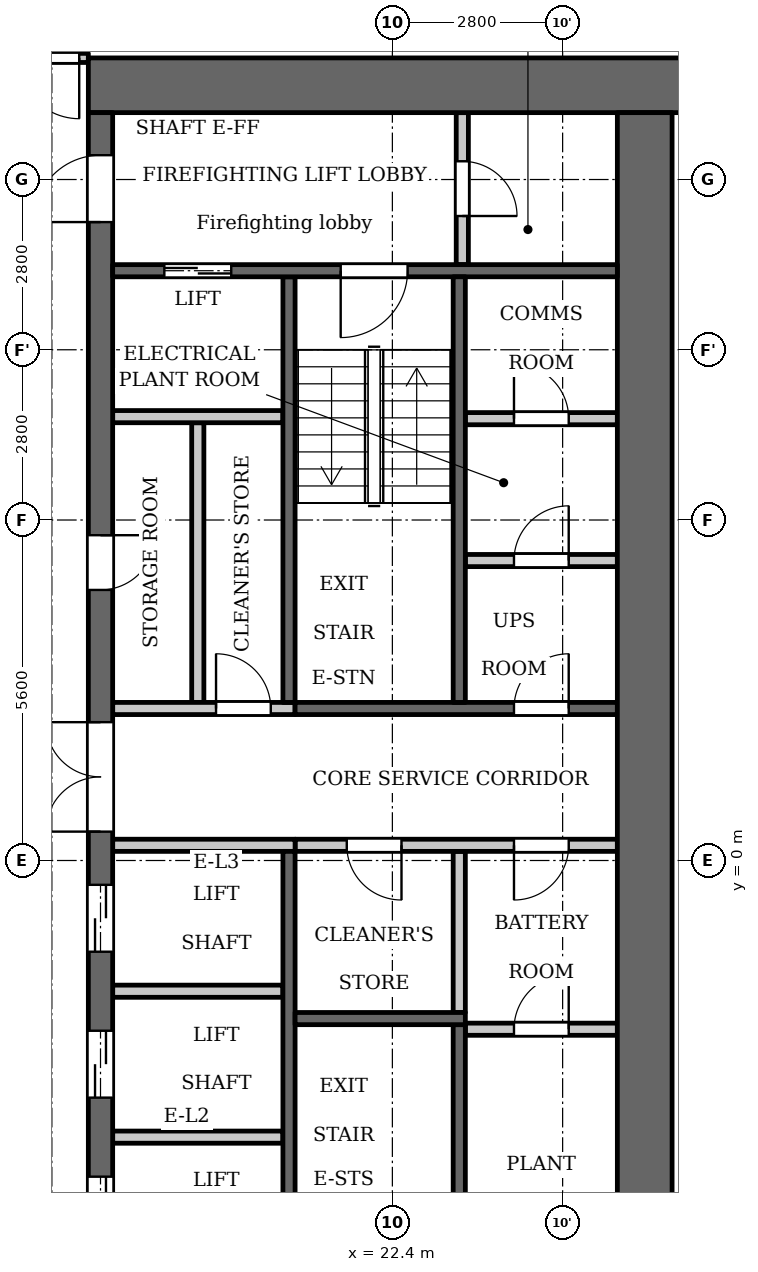
"""IFC4 building model, lengths in metres.
Left out: names, types, materials, properties, quantities, classifications, styles, units other than length and angle.
Written with IfcOpenShell. Run it as: python <this file> out.ifc"""

import sys

from ifc_helpers import new_model, si_unit, direction, frame, frame_2d, origin, place, context, subcontext, project, spatial, rectangle, extrude, element, fill, save


model = new_model("IFC4")
c1 = context("Model", 3, precision=1e-05, world=origin(), true_north=direction((0.0, 1.0)))
c2 = subcontext(c1, "Body", "Model", "MODEL_VIEW")
j1 = project(units=[si_unit("LENGTHUNIT", "METRE"), si_unit("PLANEANGLEUNIT", "RADIAN")], contexts=[c1])
p1 = place(None, origin())
s1 = spatial("IfcSite", under=j1, at=p1, CompositionType="ELEMENT")
p2 = place(p1, origin())
s2 = spatial("IfcBuilding", under=s1, at=p2, CompositionType="ELEMENT")
p3 = place(p2, frame((0.0, 0.0, 83.3)))
s3 = spatial("IfcBuildingStorey", under=s2, at=p3, CompositionType="ELEMENT", Elevation=83.3)
p4 = place(p3, frame((23.5, -2.5, 0.0), z_axis=(0.0, 0.0, 1.0), x_axis=(0.0, 1.0, 0.0)))
e1 = element("IfcWall", 1, at=p4, inside=s3, PredefinedType="PARTITIONING", context=c2, shape_type="SweptSolid", body=[
    extrude(rectangle(XDim=2.65, YDim=0.2, at=frame_2d((1.325, 0.0))), origin(), (0.0, 0.0, 1.0), 3.2),
])
p5 = place(p3, frame((20.7, 2.6, 0.0), z_axis=(0.0, 0.0, 1.0), x_axis=(0.0, 1.0, 0.0)))
e2 = element("IfcWall", 2, at=p5, inside=s3, PredefinedType="SHEAR", context=c2, shape_type="SweptSolid", body=[
    extrude(rectangle(XDim=7.0, YDim=0.2, at=frame_2d((3.5, 0.0))), origin(), (0.0, 0.0, 1.0), 3.2),
])
p6 = place(p3, frame((20.7, -9.6, 0.0), z_axis=(0.0, 0.0, 1.0), x_axis=(0.0, 1.0, 0.0)))
e3 = element("IfcWall", 3, at=p6, inside=s3, PredefinedType="SHEAR", context=c2, shape_type="SweptSolid", body=[
    extrude(rectangle(XDim=9.75, YDim=0.2, at=frame_2d((4.875, 0.0))), origin(), (0.0, 0.0, 1.0), 3.2),
])
p7 = place(p3, frame((20.8, 2.5, 0.0), z_axis=(0.0, 0.0, 1.0), x_axis=(1.0, 0.0, 0.0)))
e4 = element("IfcWall", 4, at=p7, inside=s3, PredefinedType="SHEAR", context=c2, shape_type="SweptSolid", body=[
    extrude(rectangle(XDim=5.3, YDim=0.2, at=frame_2d((2.65, 0.0))), origin(), (0.0, 0.0, 1.0), 3.2),
])
p8 = place(p7, frame((3.6, 0.0, 0.0)))
e5 = element("IfcOpeningElement", 5, at=p8, cuts=e4, PredefinedType="OPENING", context=c2, shape_type="SweptSolid", body=[
    extrude(rectangle(XDim=0.9, YDim=2.1, at=frame_2d((0.45, 1.05))), frame((0.0, 0.11, 0.0), z_axis=(0.0, -1.0, 0.0), x_axis=(1.0, 0.0, 0.0)), (0.0, 0.0, 1.0), 0.22),
])
p9 = place(p3, frame((20.8, 0.25, 0.0), z_axis=(0.0, 0.0, 1.0), x_axis=(1.0, 0.0, 0.0)))
e6 = element("IfcWall", 6, at=p9, inside=s3, PredefinedType="PARTITIONING", context=c2, shape_type="SweptSolid", body=[
    extrude(rectangle(XDim=5.3, YDim=0.2, at=frame_2d((2.65, 0.0))), origin(), (0.0, 0.0, 1.0), 3.2),
])
p10 = place(p9, frame((0.85, 0.0, 0.0)))
e7 = element("IfcOpeningElement", 7, at=p10, cuts=e6, PredefinedType="OPENING", context=c2, shape_type="SweptSolid", body=[
    extrude(rectangle(XDim=0.9, YDim=2.1, at=frame_2d((0.45, 1.05))), frame((0.0, 0.11, 0.0), z_axis=(0.0, -1.0, 0.0), x_axis=(1.0, 0.0, 0.0)), (0.0, 0.0, 1.0), 0.22),
])
p11 = place(p9, frame((3.6, 0.0, 0.0)))
e8 = element("IfcOpeningElement", 8, at=p11, cuts=e6, PredefinedType="OPENING", context=c2, shape_type="SweptSolid", body=[
    extrude(rectangle(XDim=0.9, YDim=2.1, at=frame_2d((0.45, 1.05))), frame((0.0, 0.11, 0.0), z_axis=(0.0, -1.0, 0.0), x_axis=(1.0, 0.0, 0.0)), (0.0, 0.0, 1.0), 0.22),
])
p12 = place(p3, frame((17.4, 12.75, 0.0), z_axis=(0.0, 0.0, 1.0), x_axis=(1.0, 0.0, 0.0)))
e9 = element("IfcWall", 9, at=p12, inside=s3, PredefinedType="SHEAR", context=c2, shape_type="SweptSolid", body=[
    extrude(rectangle(XDim=10.4, YDim=0.9, at=frame_2d((5.2, 0.0))), origin(), (0.0, 0.0, 1.0), 3.2),
])
p13 = place(p3, frame((19.2, 2.6, 0.0), z_axis=(0.0, 0.0, 1.0), x_axis=(0.0, 1.0, 0.0)))
e10 = element("IfcWall", 10, at=p13, inside=s3, PredefinedType="PARTITIONING", context=c2, shape_type="SweptSolid", body=[
    extrude(rectangle(XDim=4.6, YDim=0.2, at=frame_2d((2.3, 0.0))), origin(), (0.0, 0.0, 1.0), 3.2),
])
p14 = place(p3, frame((17.6, -12.3, 0.0), z_axis=(0.0, 0.0, 1.0), x_axis=(0.0, 1.0, 0.0)))
e11 = element("IfcWall", 11, at=p14, inside=s3, PredefinedType="SHEAR", context=c2, shape_type="SweptSolid", body=[
    extrude(rectangle(XDim=24.6, YDim=0.4, at=frame_2d((12.3, 0.0))), origin(), (0.0, 0.0, 1.0), 3.2),
])
p15 = place(p14, frame((6.0, 0.0, 0.0)))
e12 = element("IfcOpeningElement", 12, at=p15, cuts=e11, PredefinedType="OPENING", context=c2, shape_type="SweptSolid", body=[
    extrude(rectangle(XDim=1.1, YDim=2.1, at=frame_2d((0.55, 1.05))), frame((0.0, 0.21, 0.0), z_axis=(0.0, -1.0, 0.0), x_axis=(1.0, 0.0, 0.0)), (0.0, 0.0, 1.0), 0.42),
])
p16 = place(p14, frame((8.4, 0.0, 0.0)))
e13 = element("IfcOpeningElement", 13, at=p16, cuts=e11, PredefinedType="OPENING", context=c2, shape_type="SweptSolid", body=[
    extrude(rectangle(XDim=1.1, YDim=2.1, at=frame_2d((0.55, 1.05))), frame((0.0, 0.21, 0.0), z_axis=(0.0, -1.0, 0.0), x_axis=(1.0, 0.0, 0.0)), (0.0, 0.0, 1.0), 0.42),
])
p17 = place(p14, frame((10.8, 0.0, 0.0)))
e14 = element("IfcOpeningElement", 14, at=p17, cuts=e11, PredefinedType="OPENING", context=c2, shape_type="SweptSolid", body=[
    extrude(rectangle(XDim=1.1, YDim=2.1, at=frame_2d((0.55, 1.05))), frame((0.0, 0.21, 0.0), z_axis=(0.0, -1.0, 0.0), x_axis=(1.0, 0.0, 0.0)), (0.0, 0.0, 1.0), 0.42),
])
p18 = place(p14, frame((16.75, 0.0, 0.0)))
e15 = element("IfcOpeningElement", 15, at=p18, cuts=e11, PredefinedType="OPENING", context=c2, shape_type="SweptSolid", body=[
    extrude(rectangle(XDim=0.9, YDim=2.1, at=frame_2d((0.45, 1.05))), frame((0.0, 0.21, 0.0), z_axis=(0.0, -1.0, 0.0), x_axis=(1.0, 0.0, 0.0)), (0.0, 0.0, 1.0), 0.42),
])
p19 = place(p14, frame((22.8, 0.0, 0.0)))
e16 = element("IfcOpeningElement", 16, at=p19, cuts=e11, PredefinedType="OPENING", context=c2, shape_type="SweptSolid", body=[
    extrude(rectangle(XDim=1.1, YDim=2.1, at=frame_2d((0.55, 1.05))), frame((0.0, 0.21, 0.0), z_axis=(0.0, -1.0, 0.0), x_axis=(1.0, 0.0, 0.0)), (0.0, 0.0, 1.0), 0.42),
])
p20 = place(p14, frame((0.7, 0.0, 0.0)))
e17 = element("IfcOpeningElement", 17, at=p20, cuts=e11, PredefinedType="OPENING", context=c2, shape_type="SweptSolid", body=[
    extrude(rectangle(XDim=1.1, YDim=2.1, at=frame_2d((0.55, 1.05))), frame((0.0, 0.21, 0.0), z_axis=(0.0, -1.0, 0.0), x_axis=(1.0, 0.0, 0.0)), (0.0, 0.0, 1.0), 0.42),
])
p21 = place(p14, frame((12.775, 0.0, 0.0)))
e18 = element("IfcOpeningElement", 18, at=p21, cuts=e11, PredefinedType="OPENING", context=c2, shape_type="SweptSolid", body=[
    extrude(rectangle(XDim=1.8, YDim=2.1, at=frame_2d((0.9, 1.05))), frame((0.0, 0.21, 0.0), z_axis=(0.0, -1.0, 0.0), x_axis=(1.0, 0.0, 0.0)), (0.0, 0.0, 1.0), 0.42),
])
p22 = place(p3, frame((26.55, -12.3, 0.0), z_axis=(0.0, 0.0, 1.0), x_axis=(0.0, 1.0, 0.0)))
e19 = element("IfcWall", 19, at=p22, inside=s3, PredefinedType="SHEAR", context=c2, shape_type="SweptSolid", body=[
    extrude(rectangle(XDim=24.6, YDim=0.9, at=frame_2d((12.3, 0.0))), origin(), (0.0, 0.0, 1.0), 3.2),
])
p23 = place(p3, frame((23.55, 9.8, 0.0), z_axis=(0.0, 0.0, 1.0), x_axis=(0.0, 1.0, 0.0)))
e20 = element("IfcWall", 20, at=p23, inside=s3, PredefinedType="PARTITIONING", context=c2, shape_type="SweptSolid", body=[
    extrude(rectangle(XDim=2.5, YDim=0.2, at=frame_2d((1.25, 0.0))), origin(), (0.0, 0.0, 1.0), 3.2),
])
p24 = place(p23, frame((0.8, 0.0, 0.0)))
e21 = element("IfcOpeningElement", 21, at=p24, cuts=e20, PredefinedType="OPENING", context=c2, shape_type="SweptSolid", body=[
    extrude(rectangle(XDim=0.9, YDim=2.1, at=frame_2d((0.45, 1.05))), frame((0.0, 0.11, 0.0), z_axis=(0.0, -1.0, 0.0), x_axis=(1.0, 0.0, 0.0)), (0.0, 0.0, 1.0), 0.22),
])
p25 = place(p3, frame((23.6, -2.775, 0.0), z_axis=(0.0, 0.0, 1.0), x_axis=(1.0, 0.0, 0.0)))
e22 = element("IfcWall", 22, at=p25, inside=s3, PredefinedType="PARTITIONING", context=c2, shape_type="SweptSolid", body=[
    extrude(rectangle(XDim=2.5, YDim=0.2, at=frame_2d((1.25, 0.0))), origin(), (0.0, 0.0, 1.0), 3.2),
])
p26 = place(p25, frame((0.8, 0.0, 0.0)))
e23 = element("IfcOpeningElement", 23, at=p26, cuts=e22, PredefinedType="OPENING", context=c2, shape_type="SweptSolid", body=[
    extrude(rectangle(XDim=0.9, YDim=2.1, at=frame_2d((0.45, 1.05))), frame((0.0, 0.11, 0.0), z_axis=(0.0, -1.0, 0.0), x_axis=(1.0, 0.0, 0.0)), (0.0, 0.0, 1.0), 0.22),
])
p27 = place(p3, frame((23.6, 4.933, 0.0), z_axis=(0.0, 0.0, 1.0), x_axis=(1.0, 0.0, 0.0)))
e24 = element("IfcWall", 24, at=p27, inside=s3, PredefinedType="PARTITIONING", context=c2, shape_type="SweptSolid", body=[
    extrude(rectangle(XDim=2.5, YDim=0.2, at=frame_2d((1.25, 0.0))), origin(), (0.0, 0.0, 1.0), 3.2),
])
p28 = place(p27, frame((0.8, 0.0, 0.0)))
e25 = element("IfcOpeningElement", 25, at=p28, cuts=e24, PredefinedType="OPENING", context=c2, shape_type="SweptSolid", body=[
    extrude(rectangle(XDim=0.9, YDim=2.1, at=frame_2d((0.45, 1.05))), frame((0.0, 0.11, 0.0), z_axis=(0.0, -1.0, 0.0), x_axis=(1.0, 0.0, 0.0)), (0.0, 0.0, 1.0), 0.22),
])
p29 = place(p3, frame((23.6, 7.267, 0.0), z_axis=(0.0, 0.0, 1.0), x_axis=(1.0, 0.0, 0.0)))
e26 = element("IfcWall", 26, at=p29, inside=s3, PredefinedType="PARTITIONING", context=c2, shape_type="SweptSolid", body=[
    extrude(rectangle(XDim=2.5, YDim=0.2, at=frame_2d((1.25, 0.0))), origin(), (0.0, 0.0, 1.0), 3.2),
])
p30 = place(p29, frame((0.8, 0.0, 0.0)))
e27 = element("IfcOpeningElement", 27, at=p30, cuts=e26, PredefinedType="OPENING", context=c2, shape_type="SweptSolid", body=[
    extrude(rectangle(XDim=0.9, YDim=2.1, at=frame_2d((0.45, 1.05))), frame((0.0, 0.11, 0.0), z_axis=(0.0, -1.0, 0.0), x_axis=(1.0, 0.0, 0.0)), (0.0, 0.0, 1.0), 0.22),
])
for number, where, z_axis, x_axis in (
    (28, (17.8, -4.55, 0.0), (0.0, 0.0, 1.0), (1.0, 0.0, 0.0)),
    (29, (17.8, -2.15, 0.0), (0.0, 0.0, 1.0), (1.0, 0.0, 0.0)),
):
    element("IfcWall", number, at=place(p3, frame(where, z_axis=z_axis, x_axis=x_axis)), inside=s3, PredefinedType="PARTITIONING", context=c2, shape_type="SweptSolid", body=[
        extrude(rectangle(XDim=2.8, YDim=0.2, at=frame_2d((1.4, 0.0))), origin(), (0.0, 0.0, 1.0), 3.2),
    ])
p31 = place(p3, frame((17.8, 0.25, 0.0), z_axis=(0.0, 0.0, 1.0), x_axis=(1.0, 0.0, 0.0)))
e30 = element("IfcWall", 30, at=p31, inside=s3, PredefinedType="PARTITIONING", context=c2, shape_type="SweptSolid", body=[
    extrude(rectangle(XDim=3.0, YDim=0.2, at=frame_2d((1.5, 0.0))), origin(), (0.0, 0.0, 1.0), 3.2),
])
p32 = place(p3, frame((17.8, 2.5, 0.0), z_axis=(0.0, 0.0, 1.0), x_axis=(1.0, 0.0, 0.0)))
e31 = element("IfcWall", 31, at=p32, inside=s3, PredefinedType="PARTITIONING", context=c2, shape_type="SweptSolid", body=[
    extrude(rectangle(XDim=3.0, YDim=0.2, at=frame_2d((1.5, 0.0))), origin(), (0.0, 0.0, 1.0), 3.2),
])
p33 = place(p32, frame((1.7, 0.0, 0.0)))
e32 = element("IfcOpeningElement", 32, at=p33, cuts=e31, PredefinedType="OPENING", context=c2, shape_type="SweptSolid", body=[
    extrude(rectangle(XDim=0.9, YDim=2.1, at=frame_2d((0.45, 1.05))), frame((0.0, 0.11, 0.0), z_axis=(0.0, -1.0, 0.0), x_axis=(1.0, 0.0, 0.0)), (0.0, 0.0, 1.0), 0.22),
])
p34 = place(p3, frame((17.8, 7.3, 0.0), z_axis=(0.0, 0.0, 1.0), x_axis=(1.0, 0.0, 0.0)))
e33 = element("IfcWall", 33, at=p34, inside=s3, PredefinedType="PARTITIONING", context=c2, shape_type="SweptSolid", body=[
    extrude(rectangle(XDim=2.8, YDim=0.2, at=frame_2d((1.4, 0.0))), origin(), (0.0, 0.0, 1.0), 3.2),
])
p35 = place(p3, frame((17.8, 9.7, 0.0), z_axis=(0.0, 0.0, 1.0), x_axis=(1.0, 0.0, 0.0)))
e34 = element("IfcWall", 34, at=p35, inside=s3, PredefinedType="SHEAR", context=c2, shape_type="SweptSolid", body=[
    extrude(rectangle(XDim=8.3, YDim=0.2, at=frame_2d((4.15, 0.0))), origin(), (0.0, 0.0, 1.0), 3.2),
])
p36 = place(p35, frame((0.85, 0.0, 0.0)))
e35 = element("IfcOpeningElement", 35, at=p36, cuts=e34, PredefinedType="OPENING", context=c2, shape_type="SweptSolid", body=[
    extrude(rectangle(XDim=1.1, YDim=2.1, at=frame_2d((0.55, 1.05))), frame((0.0, 0.11, 0.0), z_axis=(0.0, -1.0, 0.0), x_axis=(1.0, 0.0, 0.0)), (0.0, 0.0, 1.0), 0.22),
])
p37 = place(p35, frame((3.75, 0.0, 0.0)))
e36 = element("IfcOpeningElement", 36, at=p37, cuts=e34, PredefinedType="OPENING", context=c2, shape_type="SweptSolid", body=[
    extrude(rectangle(XDim=1.1, YDim=2.1, at=frame_2d((0.55, 1.05))), frame((0.0, 0.11, 0.0), z_axis=(0.0, -1.0, 0.0), x_axis=(1.0, 0.0, 0.0)), (0.0, 0.0, 1.0), 0.22),
])
p38 = place(p3, frame((23.5, 2.6, 0.0), z_axis=(0.0, 0.0, 1.0), x_axis=(0.0, 1.0, 0.0)))
e37 = element("IfcWall", 37, at=p38, inside=s3, PredefinedType="SHEAR", context=c2, shape_type="SweptSolid", body=[
    extrude(rectangle(XDim=7.0, YDim=0.2, at=frame_2d((3.5, 0.0))), origin(), (0.0, 0.0, 1.0), 3.2),
])
p39 = place(p3, frame((23.5, -9.6, 0.0), z_axis=(0.0, 0.0, 1.0), x_axis=(0.0, 1.0, 0.0)))
e38 = element("IfcWall", 38, at=p39, inside=s3, PredefinedType="SHEAR", context=c2, shape_type="SweptSolid", body=[
    extrude(rectangle(XDim=6.9, YDim=0.2, at=frame_2d((3.45, 0.0))), origin(), (0.0, 0.0, 1.0), 3.2),
])
p40 = place(p3, frame((20.8, -2.6, 0.0), z_axis=(0.0, 0.0, 1.0), x_axis=(1.0, 0.0, 0.0)))
e39 = element("IfcWall", 39, at=p40, inside=s3, PredefinedType="SHEAR", context=c2, shape_type="SweptSolid", body=[
    extrude(rectangle(XDim=2.8, YDim=0.2, at=frame_2d((1.4, 0.0))), origin(), (0.0, 0.0, 1.0), 3.2),
])
p41 = place(p3, frame((-17.4, 13.2, 0.0), z_axis=(0.0, 0.0, 1.0), x_axis=(1.0, 0.0, 0.0)))
e40 = element("IfcWall", 40, at=p41, inside=s3, PredefinedType="PARTITIONING", context=c2, shape_type="SweptSolid", body=[
    extrude(rectangle(XDim=34.8, YDim=0.15, at=frame_2d((17.4, 0.0))), origin(), (0.0, 0.0, 1.0), 3.2),
])
p42 = place(p41, frame((0.25, 0.0, 0.0)))
e41 = element("IfcOpeningElement", 41, at=p42, cuts=e40, PredefinedType="OPENING", context=c2, shape_type="SweptSolid", body=[
    extrude(rectangle(XDim=1.0, YDim=2.1, at=frame_2d((0.5, 1.05))), frame((0.0, 0.085, 0.0), z_axis=(0.0, -1.0, 0.0), x_axis=(1.0, 0.0, 0.0)), (0.0, 0.0, 1.0), 0.17),
])
p43 = place(p41, frame((33.65, 0.0, 0.0)))
e42 = element("IfcOpeningElement", 42, at=p43, cuts=e40, PredefinedType="OPENING", context=c2, shape_type="SweptSolid", body=[
    extrude(rectangle(XDim=1.0, YDim=2.1, at=frame_2d((0.5, 1.05))), frame((0.0, 0.085, 0.0), z_axis=(0.0, -1.0, 0.0), x_axis=(1.0, 0.0, 0.0)), (0.0, 0.0, 1.0), 0.17),
])
p44 = place(p41, frame((15.75, 0.0, 0.0)))
e43 = element("IfcOpeningElement", 43, at=p44, cuts=e40, PredefinedType="OPENING", context=c2, shape_type="SweptSolid", body=[
    extrude(rectangle(XDim=1.0, YDim=2.1, at=frame_2d((0.5, 1.05))), frame((0.0, 0.085, 0.0), z_axis=(0.0, -1.0, 0.0), x_axis=(1.0, 0.0, 0.0)), (0.0, 0.0, 1.0), 0.17),
])
p45 = place(p41, frame((21.35, 0.0, 0.0)))
e44 = element("IfcOpeningElement", 44, at=p45, cuts=e40, PredefinedType="OPENING", context=c2, shape_type="SweptSolid", body=[
    extrude(rectangle(XDim=1.0, YDim=2.1, at=frame_2d((0.5, 1.05))), frame((0.0, 0.085, 0.0), z_axis=(0.0, -1.0, 0.0), x_axis=(1.0, 0.0, 0.0)), (0.0, 0.0, 1.0), 0.17),
])
p46 = place(p15, origin())
e45 = element("IfcDoor", 45, at=p46, inside=s3, OperationType="DOUBLE_DOOR_SLIDING", PredefinedType="DOOR", context=c2, shape_type="SweptSolid", body=[
    extrude(rectangle(XDim=1.1, YDim=2.1, at=frame_2d((0.55, 1.05))), frame((0.0, 0.025, 0.0), z_axis=(0.0, -1.0, 0.0), x_axis=(1.0, 0.0, 0.0)), (0.0, 0.0, 1.0), 0.05),
])
fill(e12, e45)
p47 = place(p16, origin())
e46 = element("IfcDoor", 46, at=p47, inside=s3, OperationType="DOUBLE_DOOR_SLIDING", PredefinedType="DOOR", context=c2, shape_type="SweptSolid", body=[
    extrude(rectangle(XDim=1.1, YDim=2.1, at=frame_2d((0.55, 1.05))), frame((0.0, 0.025, 0.0), z_axis=(0.0, -1.0, 0.0), x_axis=(1.0, 0.0, 0.0)), (0.0, 0.0, 1.0), 0.05),
])
fill(e13, e46)
p48 = place(p17, origin())
e47 = element("IfcDoor", 47, at=p48, inside=s3, OperationType="DOUBLE_DOOR_SLIDING", PredefinedType="DOOR", context=c2, shape_type="SweptSolid", body=[
    extrude(rectangle(XDim=1.1, YDim=2.1, at=frame_2d((0.55, 1.05))), frame((0.0, 0.025, 0.0), z_axis=(0.0, -1.0, 0.0), x_axis=(1.0, 0.0, 0.0)), (0.0, 0.0, 1.0), 0.05),
])
fill(e14, e47)
p49 = place(p18, origin())
e48 = element("IfcDoor", 48, at=p49, inside=s3, OperationType="SINGLE_SWING_RIGHT", PredefinedType="DOOR", context=c2, shape_type="SweptSolid", body=[
    extrude(rectangle(XDim=0.9, YDim=2.1, at=frame_2d((0.45, 1.05))), frame((0.0, 0.025, 0.0), z_axis=(0.0, -1.0, 0.0), x_axis=(1.0, 0.0, 0.0)), (0.0, 0.0, 1.0), 0.05),
])
fill(e15, e48)
p50 = place(p33, origin())
e49 = element("IfcDoor", 49, at=p50, inside=s3, OperationType="SINGLE_SWING_RIGHT", PredefinedType="DOOR", context=c2, shape_type="SweptSolid", body=[
    extrude(rectangle(XDim=0.9, YDim=2.1, at=frame_2d((0.45, 1.05))), frame((0.0, 0.025, 0.0), z_axis=(0.0, -1.0, 0.0), x_axis=(1.0, 0.0, 0.0)), (0.0, 0.0, 1.0), 0.05),
])
fill(e32, e49)
p51 = place(p36, origin())
e50 = element("IfcDoor", 50, at=p51, inside=s3, OperationType="DOUBLE_DOOR_SLIDING", PredefinedType="DOOR", context=c2, shape_type="SweptSolid", body=[
    extrude(rectangle(XDim=1.1, YDim=2.1, at=frame_2d((0.55, 1.05))), frame((0.0, 0.025, 0.0), z_axis=(0.0, -1.0, 0.0), x_axis=(1.0, 0.0, 0.0)), (0.0, 0.0, 1.0), 0.05),
])
fill(e35, e50)
p52 = place(p19, origin())
e51 = element("IfcDoor", 51, at=p52, inside=s3, OperationType="SINGLE_SWING_RIGHT", PredefinedType="DOOR", context=c2, shape_type="SweptSolid", body=[
    extrude(rectangle(XDim=1.1, YDim=2.1, at=frame_2d((0.55, 1.05))), frame((0.0, 0.025, 0.0), z_axis=(0.0, -1.0, 0.0), x_axis=(1.0, 0.0, 0.0)), (0.0, 0.0, 1.0), 0.05),
])
fill(e16, e51)
p53 = place(p24, origin())
e52 = element("IfcDoor", 52, at=p53, inside=s3, OperationType="SINGLE_SWING_LEFT", PredefinedType="DOOR", context=c2, shape_type="SweptSolid", body=[
    extrude(rectangle(XDim=0.9, YDim=2.1, at=frame_2d((0.45, 1.05))), frame((0.0, 0.025, 0.0), z_axis=(0.0, -1.0, 0.0), x_axis=(1.0, 0.0, 0.0)), (0.0, 0.0, 1.0), 0.05),
])
fill(e21, e52)
p54 = place(p37, origin())
e53 = element("IfcDoor", 53, at=p54, inside=s3, OperationType="SINGLE_SWING_LEFT", PredefinedType="DOOR", context=c2, shape_type="SweptSolid", body=[
    extrude(rectangle(XDim=1.1, YDim=2.1, at=frame_2d((0.55, 1.05))), frame((0.0, 0.025, 0.0), z_axis=(0.0, -1.0, 0.0), x_axis=(1.0, 0.0, 0.0)), (0.0, 0.0, 1.0), 0.05),
])
fill(e36, e53)
p55 = place(p21, origin())
e54 = element("IfcDoor", 54, at=p55, inside=s3, OperationType="DOUBLE_DOOR_SINGLE_SWING", PredefinedType="DOOR", context=c2, shape_type="SweptSolid", body=[
    extrude(rectangle(XDim=1.8, YDim=2.1, at=frame_2d((0.9, 1.05))), frame((0.0, 0.025, 0.0), z_axis=(0.0, -1.0, 0.0), x_axis=(1.0, 0.0, 0.0)), (0.0, 0.0, 1.0), 0.05),
])
fill(e18, e54)
p56 = place(p10, origin())
e55 = element("IfcDoor", 55, at=p56, inside=s3, OperationType="SINGLE_SWING_RIGHT", PredefinedType="DOOR", context=c2, shape_type="SweptSolid", body=[
    extrude(rectangle(XDim=0.9, YDim=2.1, at=frame_2d((0.45, 1.05))), frame((0.0, 0.025, 0.0), z_axis=(0.0, -1.0, 0.0), x_axis=(1.0, 0.0, 0.0)), (0.0, 0.0, 1.0), 0.05),
])
fill(e7, e55)
p57 = place(p26, origin())
e56 = element("IfcDoor", 56, at=p57, inside=s3, OperationType="SINGLE_SWING_LEFT", PredefinedType="DOOR", context=c2, shape_type="SweptSolid", body=[
    extrude(rectangle(XDim=0.9, YDim=2.1, at=frame_2d((0.45, 1.05))), frame((0.0, 0.025, 0.0), z_axis=(0.0, -1.0, 0.0), x_axis=(1.0, 0.0, 0.0)), (0.0, 0.0, 1.0), 0.05),
])
fill(e23, e56)
p58 = place(p11, origin())
e57 = element("IfcDoor", 57, at=p58, inside=s3, OperationType="SINGLE_SWING_LEFT", PredefinedType="DOOR", context=c2, shape_type="SweptSolid", body=[
    extrude(rectangle(XDim=0.9, YDim=2.1, at=frame_2d((0.45, 1.05))), frame((0.0, 0.025, 0.0), z_axis=(0.0, -1.0, 0.0), x_axis=(1.0, 0.0, 0.0)), (0.0, 0.0, 1.0), 0.05),
])
fill(e8, e57)
p59 = place(p28, origin())
e58 = element("IfcDoor", 58, at=p59, inside=s3, OperationType="SINGLE_SWING_LEFT", PredefinedType="DOOR", context=c2, shape_type="SweptSolid", body=[
    extrude(rectangle(XDim=0.9, YDim=2.1, at=frame_2d((0.45, 1.05))), frame((0.0, 0.025, 0.0), z_axis=(0.0, -1.0, 0.0), x_axis=(1.0, 0.0, 0.0)), (0.0, 0.0, 1.0), 0.05),
])
fill(e25, e58)
p60 = place(p30, origin())
e59 = element("IfcDoor", 59, at=p60, inside=s3, OperationType="SINGLE_SWING_RIGHT", PredefinedType="DOOR", context=c2, shape_type="SweptSolid", body=[
    extrude(rectangle(XDim=0.9, YDim=2.1, at=frame_2d((0.45, 1.05))), frame((0.0, 0.025, 0.0), z_axis=(0.0, -1.0, 0.0), x_axis=(1.0, 0.0, 0.0)), (0.0, 0.0, 1.0), 0.05),
])
fill(e27, e59)
p61 = place(p8, origin())
e60 = element("IfcDoor", 60, at=p61, inside=s3, OperationType="SINGLE_SWING_LEFT", PredefinedType="DOOR", context=c2, shape_type="SweptSolid", body=[
    extrude(rectangle(XDim=0.9, YDim=2.1, at=frame_2d((0.45, 1.05))), frame((0.0, 0.025, 0.0), z_axis=(0.0, -1.0, 0.0), x_axis=(1.0, 0.0, 0.0)), (0.0, 0.0, 1.0), 0.05),
])
fill(e5, e60)
p62 = place(p43, origin())
e61 = element("IfcDoor", 61, at=p62, inside=s3, OperationType="SINGLE_SWING_RIGHT", PredefinedType="DOOR", context=c2, shape_type="SweptSolid", body=[
    extrude(rectangle(XDim=1.0, YDim=2.1, at=frame_2d((0.5, 1.05))), frame((0.0, 0.025, 0.0), z_axis=(0.0, -1.0, 0.0), x_axis=(1.0, 0.0, 0.0)), (0.0, 0.0, 1.0), 0.05),
])
fill(e42, e61)
save(model, sys.argv[1])
